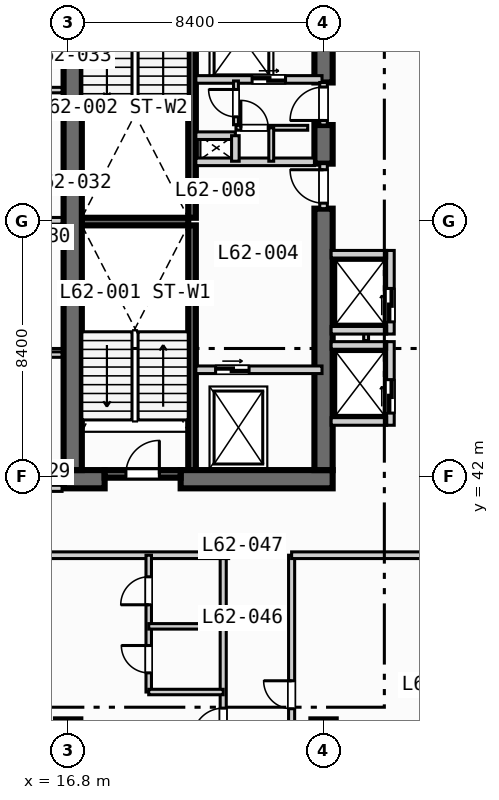
"""IFC4 building model, lengths in metres.
Left out: names, types, materials, properties, quantities, classifications, styles, units other than length and angle.
Written with IfcOpenShell. Run it as: python <this file> out.ifc"""

import sys

from ifc_helpers import new_model, si_unit, direction, frame, frame_2d, origin, origin_2d, place, context, subcontext, project, spatial, rectangle, extrude, element, fill, save


model = new_model("IFC4")
c1 = context("Model", 3, precision=1e-05, world=origin(), true_north=direction((0.0, 1.0)))
c2 = subcontext(c1, "Body", "Model", "MODEL_VIEW")
j1 = project(units=[si_unit("LENGTHUNIT", "METRE"), si_unit("PLANEANGLEUNIT", "RADIAN")], contexts=[c1])
p1 = place(None, origin())
s1 = spatial("IfcSite", under=j1, at=p1, CompositionType="ELEMENT")
p2 = place(p1, origin())
s2 = spatial("IfcBuilding", under=s1, at=p2, CompositionType="ELEMENT")
p3 = place(p2, frame((0.0, 0.0, 252.7)))
s3 = spatial("IfcBuildingStorey", under=s2, at=p3, CompositionType="ELEMENT", Elevation=252.7)
for number, where, z_axis, x_axis in (
    (1, (20.875, 42.2, 0.0), (0.0, 0.0, 1.0), (0.0, 1.0, 0.0)),
    (2, (20.875, 50.5, 0.0), (0.0, 0.0, 1.0), (0.0, 1.0, 0.0)),
):
    element("IfcWall", number, at=place(p3, frame(where, z_axis=z_axis, x_axis=x_axis)), inside=s3, PredefinedType="SOLIDWALL", context=c2, shape_type="SweptSolid", body=[
        extrude(rectangle(XDim=8.05, YDim=0.25, at=frame_2d((4.025, 0.0))), origin(), (0.0, 0.0, 1.0), 3.47),
    ])
p4 = place(p3, frame((17.25, 50.375, 0.0), z_axis=(0.0, 0.0, 1.0), x_axis=(1.0, 0.0, 0.0)))
e3 = element("IfcWall", 3, at=p4, inside=s3, PredefinedType="SOLIDWALL", context=c2, shape_type="SweptSolid", body=[
    extrude(rectangle(XDim=3.5, YDim=0.25, at=frame_2d((1.75, 0.0))), origin(), (0.0, 0.0, 1.0), 3.47),
])
p5 = place(p3, frame((16.65, 41.9, 0.0), z_axis=(0.0, 0.0, 1.0), x_axis=(1.0, 0.0, 0.0)))
e4 = element("IfcWall", 4, at=p5, inside=s3, PredefinedType="SHEAR", context=c2, shape_type="SweptSolid", body=[
    extrude(rectangle(XDim=1.35, YDim=0.6, at=frame_2d((0.675, 0.0))), origin(), (0.0, 0.0, 1.0), 3.47),
])
p6 = place(p3, frame((20.5, 41.9, 0.0), z_axis=(0.0, 0.0, 1.0), x_axis=(1.0, 0.0, 0.0)))
e5 = element("IfcWall", 5, at=p6, inside=s3, PredefinedType="SHEAR", context=c2, shape_type="SweptSolid", body=[
    extrude(rectangle(XDim=5.0, YDim=0.6, at=frame_2d((2.5, 0.0))), origin(), (0.0, 0.0, 1.0), 3.47),
])
p7 = place(p3, frame((16.95, 42.2, 0.0), z_axis=(0.0, 0.0, 1.0), x_axis=(0.0, 1.0, 0.0)))
e6 = element("IfcWall", 6, at=p7, inside=s3, PredefinedType="SHEAR", context=c2, shape_type="SweptSolid", body=[
    extrude(rectangle(XDim=16.35, YDim=0.6, at=frame_2d((8.175, 0.0))), origin(), (0.0, 0.0, 1.0), 3.47),
])
p8 = place(p3, frame((25.2, 42.2, 0.0), z_axis=(0.0, 0.0, 1.0), x_axis=(0.0, 1.0, 0.0)))
e7 = element("IfcWall", 7, at=p8, inside=s3, PredefinedType="SHEAR", context=c2, shape_type="SweptSolid", body=[
    extrude(rectangle(XDim=8.6, YDim=0.6, at=frame_2d((4.3, 0.0))), origin(), (0.0, 0.0, 1.0), 3.47),
])
p9 = place(p3, frame((25.2, 52.28, 0.0), z_axis=(0.0, 0.0, 1.0), x_axis=(0.0, 1.0, 0.0)))
e8 = element("IfcWall", 8, at=p9, inside=s3, PredefinedType="SHEAR", context=c2, shape_type="SweptSolid", body=[
    extrude(rectangle(XDim=1.27, YDim=0.6, at=frame_2d((0.635, 0.0))), origin(), (0.0, 0.0, 1.0), 3.47),
])
p10 = place(p3, frame((25.2, 54.95, 0.0), z_axis=(0.0, 0.0, 1.0), x_axis=(0.0, 1.0, 0.0)))
e9 = element("IfcWall", 9, at=p10, inside=s3, PredefinedType="SHEAR", context=c2, shape_type="SweptSolid", body=[
    extrude(rectangle(XDim=3.6, YDim=0.6, at=frame_2d((1.8, 0.0))), origin(), (0.0, 0.0, 1.0), 3.47),
])
for number, where, z_axis, x_axis in (
    (10, (16.8, 33.6, 0.0), (0.0, 0.0, 1.0), (1.0, 0.0, 0.0)),
    (11, (25.2, 33.6, 0.0), (0.0, 0.0, 1.0), (1.0, 0.0, 0.0)),
):
    element("IfcColumn", number, at=place(p3, frame(where, z_axis=z_axis, x_axis=x_axis)), inside=s3, PredefinedType="COLUMN", context=c2, shape_type="SweptSolid", body=[
        extrude(rectangle(XDim=0.8, YDim=0.8, at=origin_2d()), origin(), (0.0, 0.0, 1.0), 3.7),
    ])
p11 = place(p3, frame((18.0, 42.075, 0.0), z_axis=(0.0, 0.0, 1.0), x_axis=(1.0, 0.0, 0.0)))
e12 = element("IfcWall", 12, at=p11, inside=s3, PredefinedType="SOLIDWALL", context=c2, shape_type="SweptSolid", body=[
    extrude(rectangle(XDim=2.5, YDim=0.25, at=frame_2d((1.25, 0.0))), origin(), (0.0, 0.0, 1.0), 3.47),
])
p12 = place(p11, frame((0.7, 0.0, 0.0)))
e13 = element("IfcOpeningElement", 13, at=p12, cuts=e12, PredefinedType="OPENING", context=c2, shape_type="SweptSolid", body=[
    extrude(rectangle(XDim=1.1, YDim=2.15, at=frame_2d((0.55, 1.075))), frame((0.0, 0.135, 0.0), z_axis=(0.0, -1.0, 0.0), x_axis=(1.0, 0.0, 0.0)), (0.0, 0.0, 1.0), 0.27),
])
p13 = place(p3, frame((21.0, 45.5, 0.0), z_axis=(0.0, 0.0, 1.0), x_axis=(1.0, 0.0, 0.0)))
e14 = element("IfcWall", 14, at=p13, inside=s3, PredefinedType="SOLIDWALL", context=c2, shape_type="SweptSolid", body=[
    extrude(rectangle(XDim=4.15, YDim=0.25, at=frame_2d((2.075, 0.0))), origin(), (0.0, 0.0, 1.0), 3.47),
])
p14 = place(p13, frame((0.65, 0.0, 0.0)))
e15 = element("IfcOpeningElement", 15, at=p14, cuts=e14, PredefinedType="OPENING", context=c2, shape_type="SweptSolid", body=[
    extrude(rectangle(XDim=1.1, YDim=2.15, at=frame_2d((0.55, 1.075))), frame((0.0, 0.135, 0.0), z_axis=(0.0, -1.0, 0.0), x_axis=(1.0, 0.0, 0.0)), (0.0, 0.0, 1.0), 0.27),
])
p15 = place(p3, frame((25.2, 50.8, 0.0), z_axis=(0.0, 0.0, 1.0), x_axis=(0.0, 1.0, 0.0)))
e16 = element("IfcWall", 16, at=p15, inside=s3, PredefinedType="SOLIDWALL", context=c2, shape_type="SweptSolid", body=[
    extrude(rectangle(XDim=1.48, YDim=0.25, at=frame_2d((0.74, 0.0))), origin(), (0.0, 0.0, 1.0), 3.47),
])
p16 = place(p15, frame((0.18, 0.0, 0.0)))
e17 = element("IfcOpeningElement", 17, at=p16, cuts=e16, PredefinedType="OPENING", context=c2, shape_type="SweptSolid", body=[
    extrude(rectangle(XDim=1.1, YDim=2.15, at=frame_2d((0.55, 1.075))), frame((0.0, 0.135, 0.0), z_axis=(0.0, -1.0, 0.0), x_axis=(1.0, 0.0, 0.0)), (0.0, 0.0, 1.0), 0.27),
])
p17 = place(p3, frame((21.0, 52.34, 0.0), z_axis=(0.0, 0.0, 1.0), x_axis=(1.0, 0.0, 0.0)))
e18 = element("IfcWall", 18, at=p17, inside=s3, PredefinedType="SOLIDWALL", context=c2, shape_type="SweptSolid", body=[
    extrude(rectangle(XDim=3.9, YDim=0.25, at=frame_2d((1.95, 0.0))), origin(), (0.0, 0.0, 1.0), 3.47),
])
p18 = place(p3, frame((21.0, 55.05, 0.0), z_axis=(0.0, 0.0, 1.0), x_axis=(1.0, 0.0, 0.0)))
e19 = element("IfcWall", 19, at=p18, inside=s3, PredefinedType="SOLIDWALL", context=c2, shape_type="SweptSolid", body=[
    extrude(rectangle(XDim=4.15, YDim=0.25, at=frame_2d((2.075, 0.0))), origin(), (0.0, 0.0, 1.0), 3.47),
])
p19 = place(p18, frame((1.85, 0.0, 0.0)))
e20 = element("IfcOpeningElement", 20, at=p19, cuts=e19, PredefinedType="OPENING", context=c2, shape_type="SweptSolid", body=[
    extrude(rectangle(XDim=1.1, YDim=2.15, at=frame_2d((0.55, 1.075))), frame((0.0, 0.135, 0.0), z_axis=(0.0, -1.0, 0.0), x_axis=(1.0, 0.0, 0.0)), (0.0, 0.0, 1.0), 0.27),
])
p20 = place(p3, frame((25.2, 53.55, 0.0), z_axis=(0.0, 0.0, 1.0), x_axis=(0.0, 1.0, 0.0)))
e21 = element("IfcWall", 21, at=p20, inside=s3, PredefinedType="SOLIDWALL", context=c2, shape_type="SweptSolid", body=[
    extrude(rectangle(XDim=1.4, YDim=0.25, at=frame_2d((0.7, 0.0))), origin(), (0.0, 0.0, 1.0), 3.47),
])
p21 = place(p20, frame((0.15, 0.0, 0.0)))
e22 = element("IfcOpeningElement", 22, at=p21, cuts=e21, PredefinedType="OPENING", context=c2, shape_type="SweptSolid", body=[
    extrude(rectangle(XDim=1.1, YDim=2.15, at=frame_2d((0.55, 1.075))), frame((0.0, 0.135, 0.0), z_axis=(0.0, -1.0, 0.0), x_axis=(1.0, 0.0, 0.0)), (0.0, 0.0, 1.0), 0.27),
])
p22 = place(p3, frame((21.0, 53.2, 0.0), z_axis=(0.0, 0.0, 1.0), x_axis=(1.0, 0.0, 0.0)))
e23 = element("IfcWall", 23, at=p22, inside=s3, PredefinedType="SOLIDWALL", context=c2, shape_type="SweptSolid", body=[
    extrude(rectangle(XDim=1.3, YDim=0.25, at=frame_2d((0.65, 0.0))), origin(), (0.0, 0.0, 1.0), 3.47),
])
p23 = place(p3, frame((22.3, 52.36, 0.0), z_axis=(0.0, 0.0, 1.0), x_axis=(0.0, 1.0, 0.0)))
e24 = element("IfcWall", 24, at=p23, inside=s3, PredefinedType="SOLIDWALL", context=c2, shape_type="SweptSolid", body=[
    extrude(rectangle(XDim=0.84, YDim=0.25, at=frame_2d((0.42, 0.0))), origin(), (0.0, 0.0, 1.0), 3.47),
])
p24 = place(p3, frame((22.32, 53.56, 0.0), z_axis=(0.0, 0.0, 1.0), x_axis=(0.0, 1.0, 0.0)))
e25 = element("IfcWall", 25, at=p24, inside=s3, PredefinedType="PARTITIONING", context=c2, shape_type="SweptSolid", body=[
    extrude(rectangle(XDim=1.44, YDim=0.16, at=frame_2d((0.72, 0.0))), origin(), (0.0, 0.0, 1.0), 3.47),
])
p25 = place(p24, frame((0.26, 0.0, 0.0)))
e26 = element("IfcOpeningElement", 26, at=p25, cuts=e25, PredefinedType="OPENING", context=c2, shape_type="SweptSolid", body=[
    extrude(rectangle(XDim=0.9, YDim=2.1, at=frame_2d((0.45, 1.05))), frame((0.0, 0.09, 0.0), z_axis=(0.0, -1.0, 0.0), x_axis=(1.0, 0.0, 0.0)), (0.0, 0.0, 1.0), 0.18),
])
p26 = place(p3, frame((22.32, 53.46, 0.0), z_axis=(0.0, 0.0, 1.0), x_axis=(1.0, 0.0, 0.0)))
e27 = element("IfcWall", 27, at=p26, inside=s3, PredefinedType="PARTITIONING", context=c2, shape_type="SweptSolid", body=[
    extrude(rectangle(XDim=2.36, YDim=0.16, at=frame_2d((1.18, 0.0))), origin(), (0.0, 0.0, 1.0), 3.47),
])
p27 = place(p26, frame((0.16, 0.0, 0.0)))
e28 = element("IfcOpeningElement", 28, at=p27, cuts=e27, PredefinedType="OPENING", context=c2, shape_type="SweptSolid", body=[
    extrude(rectangle(XDim=0.9, YDim=2.1, at=frame_2d((0.45, 1.05))), frame((0.0, 0.09, 0.0), z_axis=(0.0, -1.0, 0.0), x_axis=(1.0, 0.0, 0.0)), (0.0, 0.0, 1.0), 0.18),
])
p28 = place(p3, frame((23.48, 52.36, 0.0), z_axis=(0.0, 0.0, 1.0), x_axis=(0.0, 1.0, 0.0)))
e29 = element("IfcWall", 29, at=p28, inside=s3, PredefinedType="PARTITIONING", context=c2, shape_type="SweptSolid", body=[
    extrude(rectangle(XDim=1.1, YDim=0.16, at=frame_2d((0.55, 0.0))), origin(), (0.0, 0.0, 1.0), 3.47),
])
p29 = place(p3, frame((27.4, 43.675, 0.0), z_axis=(0.0, 0.0, 1.0), x_axis=(0.0, 1.0, 0.0)))
e30 = element("IfcWall", 30, at=p29, inside=s3, PredefinedType="SOLIDWALL", context=c2, shape_type="SweptSolid", body=[
    extrude(rectangle(XDim=2.75, YDim=0.25, at=frame_2d((1.375, 0.0))), origin(), (0.0, 0.0, 1.0), 3.47),
])
p30 = place(p29, frame((0.4, 0.0, 0.0)))
e31 = element("IfcOpeningElement", 31, at=p30, cuts=e30, PredefinedType="OPENING", context=c2, shape_type="SweptSolid", body=[
    extrude(rectangle(XDim=1.1, YDim=2.15, at=frame_2d((0.55, 1.075))), frame((0.0, 0.135, 0.0), z_axis=(0.0, -1.0, 0.0), x_axis=(1.0, 0.0, 0.0)), (0.0, 0.0, 1.0), 0.27),
])
for number, where, z_axis, x_axis in (
    (32, (25.45, 43.8, 0.0), (0.0, 0.0, 1.0), (1.0, 0.0, 0.0)),
    (33, (25.45, 46.3, 0.0), (0.0, 0.0, 1.0), (1.0, 0.0, 0.0)),
):
    element("IfcWall", number, at=place(p3, frame(where, z_axis=z_axis, x_axis=x_axis)), inside=s3, PredefinedType="SOLIDWALL", context=c2, shape_type="SweptSolid", body=[
        extrude(rectangle(XDim=1.825, YDim=0.25, at=frame_2d((0.913, 0.0))), origin(), (0.0, 0.0, 1.0), 3.47),
    ])
p31 = place(p3, frame((26.6, 46.46, 0.0), z_axis=(0.0, 0.0, 1.0), x_axis=(0.0, 1.0, 0.0)))
e34 = element("IfcWall", 34, at=p31, inside=s3, PredefinedType="PARTITIONING", context=c2, shape_type="SweptSolid", body=[
    extrude(rectangle(XDim=0.88, YDim=0.16, at=frame_2d((0.44, 0.0))), origin(), (0.0, 0.0, 1.0), 3.47),
])
p32 = place(p3, frame((27.4, 46.675, 0.0), z_axis=(0.0, 0.0, 1.0), x_axis=(0.0, 1.0, 0.0)))
e35 = element("IfcWall", 35, at=p32, inside=s3, PredefinedType="SOLIDWALL", context=c2, shape_type="SweptSolid", body=[
    extrude(rectangle(XDim=2.75, YDim=0.25, at=frame_2d((1.375, 0.0))), origin(), (0.0, 0.0, 1.0), 3.47),
])
p33 = place(p32, frame((0.4, 0.0, 0.0)))
e36 = element("IfcOpeningElement", 36, at=p33, cuts=e35, PredefinedType="OPENING", context=c2, shape_type="SweptSolid", body=[
    extrude(rectangle(XDim=1.1, YDim=2.15, at=frame_2d((0.55, 1.075))), frame((0.0, 0.135, 0.0), z_axis=(0.0, -1.0, 0.0), x_axis=(1.0, 0.0, 0.0)), (0.0, 0.0, 1.0), 0.27),
])
for number, where, z_axis, x_axis in (
    (37, (25.45, 46.8, 0.0), (0.0, 0.0, 1.0), (1.0, 0.0, 0.0)),
    (38, (25.45, 49.3, 0.0), (0.0, 0.0, 1.0), (1.0, 0.0, 0.0)),
):
    element("IfcWall", number, at=place(p3, frame(where, z_axis=z_axis, x_axis=x_axis)), inside=s3, PredefinedType="SOLIDWALL", context=c2, shape_type="SweptSolid", body=[
        extrude(rectangle(XDim=1.825, YDim=0.25, at=frame_2d((0.913, 0.0))), origin(), (0.0, 0.0, 1.0), 3.47),
    ])
p34 = place(p3, frame((24.15, 30.6, 0.0), z_axis=(0.0, 0.0, 1.0), x_axis=(0.0, 1.0, 0.0)))
e39 = element("IfcWall", 39, at=p34, inside=s3, PredefinedType="PARTITIONING", context=c2, shape_type="SweptSolid", body=[
    extrude(rectangle(XDim=8.8, YDim=0.2, at=frame_2d((4.4, 0.0))), origin(), (0.0, 0.0, 1.0), 3.47),
])
p35 = place(p34, frame((3.75, 0.0, 0.0)))
e40 = element("IfcOpeningElement", 40, at=p35, cuts=e39, PredefinedType="OPENING", context=c2, shape_type="SweptSolid", body=[
    extrude(rectangle(XDim=0.92, YDim=2.1, at=frame_2d((0.46, 1.05))), frame((0.0, 0.11, 0.0), z_axis=(0.0, -1.0, 0.0), x_axis=(1.0, 0.0, 0.0)), (0.0, 0.0, 1.0), 0.22),
])
p36 = place(p3, frame((24.15, 39.4, 0.0), z_axis=(0.0, 0.0, 1.0), x_axis=(1.0, 0.0, 0.0)))
e41 = element("IfcWall", 41, at=p36, inside=s3, PredefinedType="PARTITIONING", context=c2, shape_type="SweptSolid", body=[
    extrude(rectangle(XDim=9.15, YDim=0.22, at=frame_2d((4.575, 0.0))), origin(), (0.0, 0.0, 1.0), 3.47),
])
p37 = place(p3, frame((8.65, 41.6, 0.0), z_axis=(0.0, 0.0, 1.0), x_axis=(1.0, 0.0, 0.0)))
e42 = element("IfcWall", 42, at=p37, inside=s3, PredefinedType="PARTITIONING", context=c2, shape_type="SweptSolid", body=[
    extrude(rectangle(XDim=7.95, YDim=0.2, at=frame_2d((3.975, 0.0))), origin(), (0.0, 0.0, 1.0), 3.47),
])
p38 = place(p37, frame((2.0, 0.0, 0.0)))
e43 = element("IfcOpeningElement", 43, at=p38, cuts=e42, PredefinedType="OPENING", context=c2, shape_type="SweptSolid", body=[
    extrude(rectangle(XDim=1.0, YDim=2.15, at=frame_2d((0.5, 1.075))), frame((0.0, 0.11, 0.0), z_axis=(0.0, -1.0, 0.0), x_axis=(1.0, 0.0, 0.0)), (0.0, 0.0, 1.0), 0.22),
])
p39 = place(p3, frame((8.65, 50.4, 0.0), z_axis=(0.0, 0.0, 1.0), x_axis=(1.0, 0.0, 0.0)))
e44 = element("IfcWall", 44, at=p39, inside=s3, PredefinedType="PARTITIONING", context=c2, shape_type="SweptSolid", body=[
    extrude(rectangle(XDim=7.95, YDim=0.22, at=frame_2d((3.975, 0.0))), origin(), (0.0, 0.0, 1.0), 2.859),
])
for number, where, z_axis, x_axis in (
    (45, (13.8, 46.0, 0.0), (0.0, 0.0, 1.0), (1.0, 0.0, 0.0)),
    (46, (13.8, 54.7, 0.0), (0.0, 0.0, 1.0), (1.0, 0.0, 0.0)),
):
    element("IfcWall", number, at=place(p3, frame(where, z_axis=z_axis, x_axis=x_axis)), inside=s3, PredefinedType="PLUMBINGWALL", context=c2, shape_type="SweptSolid", body=[
        extrude(rectangle(XDim=2.8, YDim=0.18, at=frame_2d((1.4, 0.0))), origin(), (0.0, 0.0, 1.0), 3.47),
    ])
p40 = place(p3, frame((21.9, 30.65, 0.0), z_axis=(0.0, 0.0, 1.0), x_axis=(0.0, 1.0, 0.0)))
e47 = element("IfcWall", 47, at=p40, inside=s3, PredefinedType="PARTITIONING", context=c2, shape_type="SweptSolid", body=[
    extrude(rectangle(XDim=8.75, YDim=0.2, at=frame_2d((4.375, 0.0))), origin(), (0.0, 0.0, 1.0), 3.47),
])
p41 = place(p40, frame((2.72, 0.0, 0.0)))
e48 = element("IfcOpeningElement", 48, at=p41, cuts=e47, PredefinedType="OPENING", context=c2, shape_type="SweptSolid", body=[
    extrude(rectangle(XDim=1.0, YDim=2.15, at=frame_2d((0.5, 1.075))), frame((0.0, 0.11, 0.0), z_axis=(0.0, -1.0, 0.0), x_axis=(1.0, 0.0, 0.0)), (0.0, 0.0, 1.0), 0.22),
])
p42 = place(p3, frame((8.6, 39.4, 0.0), z_axis=(0.0, 0.0, 1.0), x_axis=(1.0, 0.0, 0.0)))
e49 = element("IfcWall", 49, at=p42, inside=s3, PredefinedType="PARTITIONING", context=c2, shape_type="SweptSolid", body=[
    extrude(rectangle(XDim=13.48, YDim=0.22, at=frame_2d((6.74, 0.0))), origin(), (0.0, 0.0, 1.0), 3.47),
])
p43 = place(p3, frame((19.45, 34.9, 0.0), z_axis=(0.0, 0.0, 1.0), x_axis=(0.0, 1.0, 0.0)))
e50 = element("IfcWall", 50, at=p43, inside=s3, PredefinedType="PLUMBINGWALL", context=c2, shape_type="SweptSolid", body=[
    extrude(rectangle(XDim=4.5, YDim=0.18, at=frame_2d((2.25, 0.0))), origin(), (0.0, 0.0, 1.0), 3.47),
])
p44 = place(p43, frame((0.63, 0.0, 0.0)))
e51 = element("IfcOpeningElement", 51, at=p44, cuts=e50, PredefinedType="OPENING", context=c2, shape_type="SweptSolid", body=[
    extrude(rectangle(XDim=0.9, YDim=2.1, at=frame_2d((0.45, 1.05))), frame((0.0, 0.1, 0.0), z_axis=(0.0, -1.0, 0.0), x_axis=(1.0, 0.0, 0.0)), (0.0, 0.0, 1.0), 0.2),
])
p45 = place(p43, frame((2.87, 0.0, 0.0)))
e52 = element("IfcOpeningElement", 52, at=p45, cuts=e50, PredefinedType="OPENING", context=c2, shape_type="SweptSolid", body=[
    extrude(rectangle(XDim=0.92, YDim=2.1, at=frame_2d((0.46, 1.05))), frame((0.0, 0.1, 0.0), z_axis=(0.0, -1.0, 0.0), x_axis=(1.0, 0.0, 0.0)), (0.0, 0.0, 1.0), 0.2),
])
for number, where, z_axis, x_axis in (
    (53, (19.45, 34.9, 0.0), (0.0, 0.0, 1.0), (1.0, 0.0, 0.0)),
    (54, (19.45, 37.06, 0.0), (0.0, 0.0, 1.0), (1.0, 0.0, 0.0)),
):
    element("IfcWall", number, at=place(p3, frame(where, z_axis=z_axis, x_axis=x_axis)), inside=s3, PredefinedType="PLUMBINGWALL", context=c2, shape_type="SweptSolid", body=[
        extrude(rectangle(XDim=2.45, YDim=0.18, at=frame_2d((1.225, 0.0))), origin(), (0.0, 0.0, 1.0), 3.47),
    ])
p46 = place(p12, origin())
e55 = element("IfcDoor", 55, at=p46, inside=s3, OperationType="SINGLE_SWING_RIGHT", PredefinedType="DOOR", context=c2, shape_type="SweptSolid", body=[
    extrude(rectangle(XDim=1.1, YDim=2.15, at=frame_2d((0.55, 1.075))), frame((0.0, 0.025, 0.0), z_axis=(0.0, -1.0, 0.0), x_axis=(1.0, 0.0, 0.0)), (0.0, 0.0, 1.0), 0.05),
])
fill(e13, e55)
p47 = place(p14, origin())
e56 = element("IfcDoor", 56, at=p47, inside=s3, OperationType="SLIDING_TO_LEFT", PredefinedType="DOOR", context=c2, shape_type="SweptSolid", body=[
    extrude(rectangle(XDim=1.1, YDim=2.15, at=frame_2d((0.55, 1.075))), frame((0.0, 0.025, 0.0), z_axis=(0.0, -1.0, 0.0), x_axis=(1.0, 0.0, 0.0)), (0.0, 0.0, 1.0), 0.05),
])
fill(e15, e56)
p48 = place(p16, origin())
e57 = element("IfcDoor", 57, at=p48, inside=s3, OperationType="SINGLE_SWING_RIGHT", PredefinedType="DOOR", context=c2, shape_type="SweptSolid", body=[
    extrude(rectangle(XDim=1.1, YDim=2.15, at=frame_2d((0.55, 1.075))), frame((0.0, 0.025, 0.0), z_axis=(0.0, -1.0, 0.0), x_axis=(1.0, 0.0, 0.0)), (0.0, 0.0, 1.0), 0.05),
])
fill(e17, e57)
p49 = place(p19, origin())
e58 = element("IfcDoor", 58, at=p49, inside=s3, OperationType="SLIDING_TO_LEFT", PredefinedType="DOOR", context=c2, shape_type="SweptSolid", body=[
    extrude(rectangle(XDim=1.1, YDim=2.15, at=frame_2d((0.55, 1.075))), frame((0.0, 0.025, 0.0), z_axis=(0.0, -1.0, 0.0), x_axis=(1.0, 0.0, 0.0)), (0.0, 0.0, 1.0), 0.05),
])
fill(e20, e58)
p50 = place(p21, origin())
e59 = element("IfcDoor", 59, at=p50, inside=s3, OperationType="SINGLE_SWING_LEFT", PredefinedType="DOOR", context=c2, shape_type="SweptSolid", body=[
    extrude(rectangle(XDim=1.1, YDim=2.15, at=frame_2d((0.55, 1.075))), frame((0.0, 0.025, 0.0), z_axis=(0.0, -1.0, 0.0), x_axis=(1.0, 0.0, 0.0)), (0.0, 0.0, 1.0), 0.05),
])
fill(e22, e59)
p51 = place(p25, origin())
e60 = element("IfcDoor", 60, at=p51, inside=s3, OperationType="SINGLE_SWING_RIGHT", PredefinedType="DOOR", context=c2, shape_type="SweptSolid", body=[
    extrude(rectangle(XDim=0.9, YDim=2.1, at=frame_2d((0.45, 1.05))), frame((0.0, 0.025, 0.0), z_axis=(0.0, -1.0, 0.0), x_axis=(1.0, 0.0, 0.0)), (0.0, 0.0, 1.0), 0.05),
])
fill(e26, e60)
p52 = place(p27, origin())
e61 = element("IfcDoor", 61, at=p52, inside=s3, OperationType="SINGLE_SWING_LEFT", PredefinedType="DOOR", context=c2, shape_type="SweptSolid", body=[
    extrude(rectangle(XDim=0.9, YDim=2.1, at=frame_2d((0.45, 1.05))), frame((0.0, 0.025, 0.0), z_axis=(0.0, -1.0, 0.0), x_axis=(1.0, 0.0, 0.0)), (0.0, 0.0, 1.0), 0.05),
])
fill(e28, e61)
p53 = place(p30, origin())
e62 = element("IfcDoor", 62, at=p53, inside=s3, OperationType="SLIDING_TO_LEFT", PredefinedType="DOOR", context=c2, shape_type="SweptSolid", body=[
    extrude(rectangle(XDim=1.1, YDim=2.15, at=frame_2d((0.55, 1.075))), frame((0.0, 0.025, 0.0), z_axis=(0.0, -1.0, 0.0), x_axis=(1.0, 0.0, 0.0)), (0.0, 0.0, 1.0), 0.05),
])
fill(e31, e62)
p54 = place(p33, origin())
e63 = element("IfcDoor", 63, at=p54, inside=s3, OperationType="SLIDING_TO_LEFT", PredefinedType="DOOR", context=c2, shape_type="SweptSolid", body=[
    extrude(rectangle(XDim=1.1, YDim=2.15, at=frame_2d((0.55, 1.075))), frame((0.0, 0.025, 0.0), z_axis=(0.0, -1.0, 0.0), x_axis=(1.0, 0.0, 0.0)), (0.0, 0.0, 1.0), 0.05),
])
fill(e36, e63)
p55 = place(p35, origin())
e64 = element("IfcDoor", 64, at=p55, inside=s3, OperationType="SINGLE_SWING_RIGHT", PredefinedType="DOOR", context=c2, shape_type="SweptSolid", body=[
    extrude(rectangle(XDim=0.92, YDim=2.1, at=frame_2d((0.46, 1.05))), frame((0.0, 0.025, 0.0), z_axis=(0.0, -1.0, 0.0), x_axis=(1.0, 0.0, 0.0)), (0.0, 0.0, 1.0), 0.05),
])
fill(e40, e64)
p56 = place(p41, origin())
e65 = element("IfcDoor", 65, at=p56, inside=s3, OperationType="SINGLE_SWING_LEFT", PredefinedType="DOOR", context=c2, shape_type="SweptSolid", body=[
    extrude(rectangle(XDim=1.0, YDim=2.15, at=frame_2d((0.5, 1.075))), frame((0.0, 0.025, 0.0), z_axis=(0.0, -1.0, 0.0), x_axis=(1.0, 0.0, 0.0)), (0.0, 0.0, 1.0), 0.05),
])
fill(e48, e65)
p57 = place(p44, origin())
e66 = element("IfcDoor", 66, at=p57, inside=s3, OperationType="SINGLE_SWING_RIGHT", PredefinedType="DOOR", context=c2, shape_type="SweptSolid", body=[
    extrude(rectangle(XDim=0.9, YDim=2.1, at=frame_2d((0.45, 1.05))), frame((0.0, 0.025, 0.0), z_axis=(0.0, -1.0, 0.0), x_axis=(1.0, 0.0, 0.0)), (0.0, 0.0, 1.0), 0.05),
])
fill(e51, e66)
p58 = place(p45, origin())
e67 = element("IfcDoor", 67, at=p58, inside=s3, OperationType="SINGLE_SWING_LEFT", PredefinedType="DOOR", context=c2, shape_type="SweptSolid", body=[
    extrude(rectangle(XDim=0.92, YDim=2.1, at=frame_2d((0.46, 1.05))), frame((0.0, 0.025, 0.0), z_axis=(0.0, -1.0, 0.0), x_axis=(1.0, 0.0, 0.0)), (0.0, 0.0, 1.0), 0.05),
])
fill(e52, e67)
save(model, sys.argv[1])
